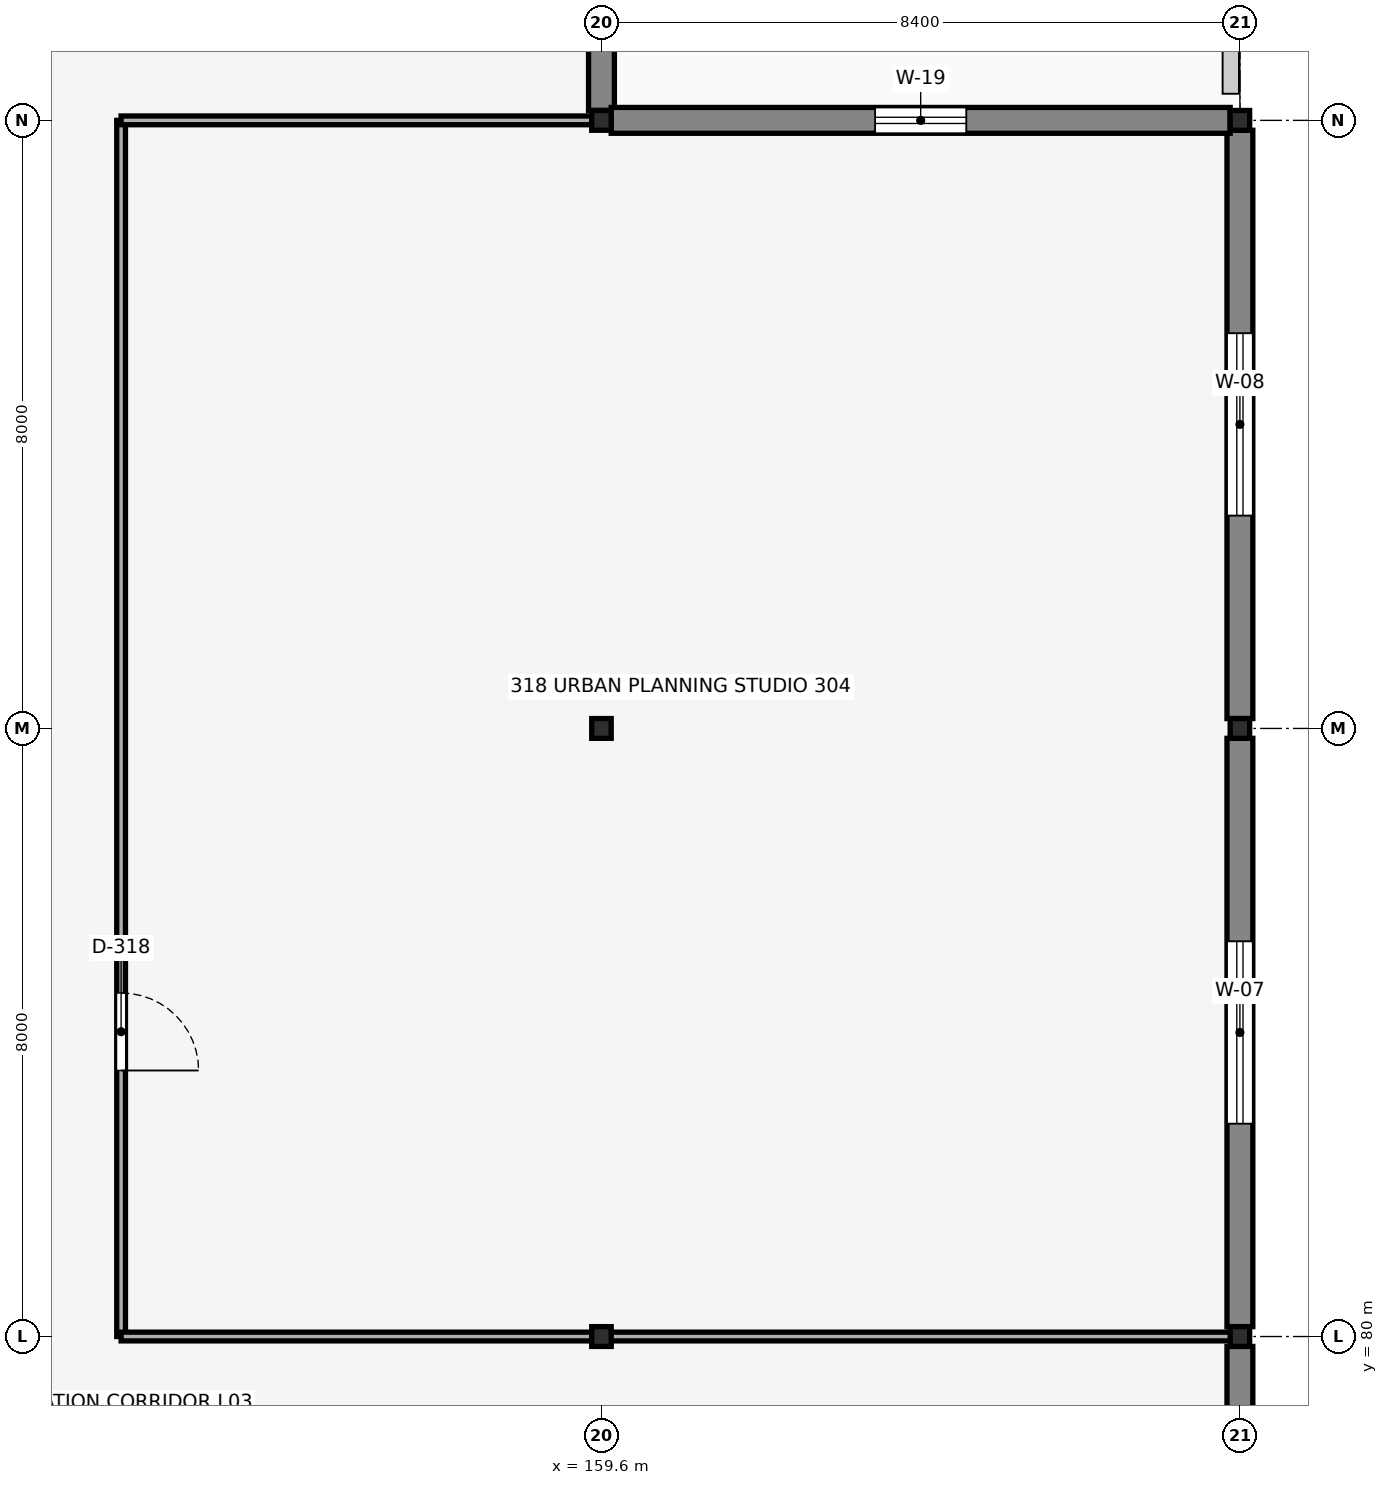
"""IFC4 building model, lengths in metres.
Left out: names, types, materials, properties, quantities, classifications, styles, units other than length and angle.
Written with IfcOpenShell. Run it as: python <this file> out.ifc"""

import sys

from ifc_helpers import new_model, si_unit, direction, frame, frame_2d, origin, origin_2d, place, context, subcontext, project, spatial, rectangle, i_section, extrude, element, fill, save


model = new_model("IFC4")
c1 = context("Model", 3, precision=1e-05, world=origin(), true_north=direction((0.0, 1.0)))
c2 = subcontext(c1, "Body", "Model", "MODEL_VIEW")
j1 = project(units=[si_unit("LENGTHUNIT", "METRE"), si_unit("PLANEANGLEUNIT", "RADIAN")], contexts=[c1])
p1 = place(None, origin())
s1 = spatial("IfcSite", under=j1, at=p1, CompositionType="ELEMENT")
p2 = place(p1, origin())
s2 = spatial("IfcBuilding", under=s1, at=p2, CompositionType="ELEMENT")
p3 = place(p2, frame((0.0, 0.0, 13.36)))
s3 = spatial("IfcBuildingStorey", under=s2, at=p3, CompositionType="ELEMENT", Elevation=13.36)
for number, where, z_axis, x_axis in (
    (1, (159.6, 80.0, 0.0), (0.0, 0.0, 1.0), (1.0, 0.0, 0.0)),
    (2, (159.6, 88.0, 0.0), (0.0, 0.0, 1.0), (1.0, 0.0, 0.0)),
    (3, (159.6, 96.0, 0.0), (0.0, 0.0, 1.0), (1.0, 0.0, 0.0)),
    (4, (168.0, 80.0, 0.0), (0.0, 0.0, 1.0), (1.0, 0.0, 0.0)),
    (5, (168.0, 88.0, 0.0), (0.0, 0.0, 1.0), (1.0, 0.0, 0.0)),
    (6, (168.0, 96.0, 0.0), (0.0, 0.0, 1.0), (1.0, 0.0, 0.0)),
):
    element("IfcColumn", number, at=place(p3, frame(where, z_axis=z_axis, x_axis=x_axis)), inside=s3, PredefinedType="COLUMN", context=c2, shape_type="SweptSolid", body=[
        extrude(i_section(OverallWidth=0.256, OverallDepth=0.26, WebThickness=0.01, FlangeThickness=0.017, FilletRadius=0.013, at=origin_2d()), origin(), (0.0, 0.0, 1.0), 3.58),
    ])
p4 = place(p3, frame((168.0, 72.13, 0.0), z_axis=(0.0, 0.0, 1.0), x_axis=(0.0, 1.0, 0.0)))
e7 = element("IfcWall", 7, at=p4, inside=s3, PredefinedType="SOLIDWALL", context=c2, shape_type="SweptSolid", body=[
    extrude(rectangle(XDim=7.74, YDim=0.34, at=frame_2d((3.87, 0.0))), origin(), (0.0, 0.0, 1.0), 3.28),
])
p5 = place(p3, frame((168.0, 80.13, 0.0), z_axis=(0.0, 0.0, 1.0), x_axis=(0.0, 1.0, 0.0)))
e8 = element("IfcWall", 8, at=p5, inside=s3, PredefinedType="SOLIDWALL", context=c2, shape_type="SweptSolid", body=[
    extrude(rectangle(XDim=7.74, YDim=0.34, at=frame_2d((3.87, 0.0))), origin(), (0.0, 0.0, 1.0), 3.28),
])
p6 = place(p5, frame((2.67, 0.0, 0.9), z_axis=(0.0, 0.0, 1.0), x_axis=(1.0, 0.0, 0.0)))
e9 = element("IfcOpeningElement", 9, at=p6, cuts=e8, PredefinedType="OPENING", context=c2, shape_type="SweptSolid", body=[
    extrude(rectangle(XDim=2.4, YDim=1.75, at=frame_2d((1.2, 0.875))), frame((0.0, 0.18, 0.0), z_axis=(0.0, -1.0, 0.0), x_axis=(1.0, 0.0, 0.0)), (0.0, 0.0, 1.0), 0.36),
])
p7 = place(p3, frame((168.0, 88.13, 0.0), z_axis=(0.0, 0.0, 1.0), x_axis=(0.0, 1.0, 0.0)))
e10 = element("IfcWall", 10, at=p7, inside=s3, PredefinedType="SOLIDWALL", context=c2, shape_type="SweptSolid", body=[
    extrude(rectangle(XDim=7.74, YDim=0.34, at=frame_2d((3.87, 0.0))), origin(), (0.0, 0.0, 1.0), 3.28),
])
p8 = place(p7, frame((2.67, 0.0, 0.9), z_axis=(0.0, 0.0, 1.0), x_axis=(1.0, 0.0, 0.0)))
e11 = element("IfcOpeningElement", 11, at=p8, cuts=e10, PredefinedType="OPENING", context=c2, shape_type="SweptSolid", body=[
    extrude(rectangle(XDim=2.4, YDim=1.5, at=frame_2d((1.2, 0.75))), frame((0.0, 0.18, 0.0), z_axis=(0.0, -1.0, 0.0), x_axis=(1.0, 0.0, 0.0)), (0.0, 0.0, 1.0), 0.36),
])
p9 = place(p3, frame((159.6, 96.13, 0.0), z_axis=(0.0, 0.0, 1.0), x_axis=(0.0, 1.0, 0.0)))
e12 = element("IfcWall", 12, at=p9, inside=s3, PredefinedType="SOLIDWALL", context=c2, shape_type="SweptSolid", body=[
    extrude(rectangle(XDim=7.74, YDim=0.34, at=frame_2d((3.87, 0.0))), origin(), (0.0, 0.0, 1.0), 3.28),
])
p10 = place(p9, frame((3.395, 0.0, 0.65), z_axis=(0.0, 0.0, 1.0), x_axis=(1.0, 0.0, 0.0)))
e13 = element("IfcOpeningElement", 13, at=p10, cuts=e12, PredefinedType="OPENING", context=c2, shape_type="SweptSolid", body=[
    extrude(rectangle(XDim=0.95, YDim=2.1, at=frame_2d((0.475, 1.05))), frame((0.0, 0.18, 0.0), z_axis=(0.0, -1.0, 0.0), x_axis=(1.0, 0.0, 0.0)), (0.0, 0.0, 1.0), 0.36),
])
p11 = place(p3, frame((159.728, 96.0, 0.0), z_axis=(0.0, 0.0, 1.0), x_axis=(1.0, 0.0, 0.0)))
e14 = element("IfcWall", 14, at=p11, inside=s3, PredefinedType="SOLIDWALL", context=c2, shape_type="SweptSolid", body=[
    extrude(rectangle(XDim=8.144, YDim=0.34, at=frame_2d((4.072, 0.0))), origin(), (0.0, 0.0, 1.0), 3.28),
])
p12 = place(p11, frame((3.472, 0.0, 1.55), z_axis=(0.0, 0.0, 1.0), x_axis=(1.0, 0.0, 0.0)))
e15 = element("IfcOpeningElement", 15, at=p12, cuts=e14, PredefinedType="OPENING", context=c2, shape_type="SweptSolid", body=[
    extrude(rectangle(XDim=1.2, YDim=0.95, at=frame_2d((0.6, 0.475))), frame((0.0, 0.18, 0.0), z_axis=(0.0, -1.0, 0.0), x_axis=(1.0, 0.0, 0.0)), (0.0, 0.0, 1.0), 0.36),
])
p13 = place(p3, frame((167.88, 111.88, 0.0), z_axis=(0.0, 0.0, 1.0), x_axis=(0.0, -1.0, 0.0)))
e16 = element("IfcWall", 16, at=p13, inside=s3, PredefinedType="PARAPET", context=c2, shape_type="SweptSolid", body=[
    extrude(rectangle(XDim=15.53, YDim=0.215, at=frame_2d((7.765, 0.0))), origin(), (0.0, 0.0, 1.0), 1.05),
])
p14 = place(p3, frame((153.28, 80.0, 0.0), z_axis=(0.0, 0.0, 1.0), x_axis=(0.0, 1.0, 0.0)))
e17 = element("IfcWall", 17, at=p14, inside=s3, PredefinedType="PARTITIONING", context=c2, shape_type="SweptSolid", body=[
    extrude(rectangle(XDim=16.0, YDim=0.115, at=frame_2d((8.0, 0.0))), origin(), (0.0, 0.0, 1.0), 3.58),
])
p15 = place(p14, frame((4.52, 0.0, 0.0), z_axis=(0.0, 0.0, 1.0), x_axis=(-1.0, 0.0, 0.0)))
e18 = element("IfcOpeningElement", 18, at=p15, cuts=e17, PredefinedType="OPENING", context=c2, shape_type="SweptSolid", body=[
    extrude(rectangle(XDim=1.02, YDim=2.16, at=frame_2d((0.51, 1.08))), frame((0.0, 0.067, 0.0), z_axis=(0.0, -1.0, 0.0), x_axis=(1.0, 0.0, 0.0)), (0.0, 0.0, 1.0), 0.135),
])
p16 = place(p3, frame((153.28, 80.0, 0.0), z_axis=(0.0, 0.0, 1.0), x_axis=(1.0, 0.0, 0.0)))
e19 = element("IfcWall", 19, at=p16, inside=s3, PredefinedType="PARTITIONING", context=c2, shape_type="SweptSolid", body=[
    extrude(rectangle(XDim=6.202, YDim=0.115, at=frame_2d((3.101, 0.0))), origin(), (0.0, 0.0, 1.0), 3.123),
])
p17 = place(p3, frame((159.718, 80.0, 0.0), z_axis=(0.0, 0.0, 1.0), x_axis=(1.0, 0.0, 0.0)))
e20 = element("IfcWall", 20, at=p17, inside=s3, PredefinedType="PARTITIONING", context=c2, shape_type="SweptSolid", body=[
    extrude(rectangle(XDim=8.164, YDim=0.115, at=frame_2d((4.082, 0.0))), origin(), (0.0, 0.0, 1.0), 3.123),
])
p18 = place(p3, frame((153.28, 96.0, 0.0), z_axis=(0.0, 0.0, 1.0), x_axis=(1.0, 0.0, 0.0)))
e21 = element("IfcWall", 21, at=p18, inside=s3, PredefinedType="PARTITIONING", context=c2, shape_type="SweptSolid", body=[
    extrude(rectangle(XDim=6.202, YDim=0.115, at=frame_2d((3.101, 0.0))), origin(), (0.0, 0.0, 1.0), 3.123),
])
p19 = place(p6, origin())
e22 = element("IfcWindow", 22, at=p19, inside=s3, PartitioningType="DOUBLE_PANEL_VERTICAL", PredefinedType="WINDOW", context=c2, shape_type="SweptSolid", body=[
    extrude(rectangle(XDim=2.4, YDim=1.75, at=frame_2d((1.2, 0.875))), frame((0.0, 0.03, 0.0), z_axis=(0.0, -1.0, 0.0), x_axis=(1.0, 0.0, 0.0)), (0.0, 0.0, 1.0), 0.06),
])
fill(e9, e22)
p20 = place(p8, origin())
e23 = element("IfcWindow", 23, at=p20, inside=s3, PartitioningType="DOUBLE_PANEL_VERTICAL", PredefinedType="WINDOW", context=c2, shape_type="SweptSolid", body=[
    extrude(rectangle(XDim=2.4, YDim=1.5, at=frame_2d((1.2, 0.75))), frame((0.0, 0.03, 0.0), z_axis=(0.0, -1.0, 0.0), x_axis=(1.0, 0.0, 0.0)), (0.0, 0.0, 1.0), 0.06),
])
fill(e11, e23)
p21 = place(p12, origin())
e24 = element("IfcWindow", 24, at=p21, inside=s3, PartitioningType="SINGLE_PANEL", PredefinedType="WINDOW", context=c2, shape_type="SweptSolid", body=[
    extrude(rectangle(XDim=1.2, YDim=0.95, at=frame_2d((0.6, 0.475))), frame((0.0, 0.03, 0.0), z_axis=(0.0, -1.0, 0.0), x_axis=(1.0, 0.0, 0.0)), (0.0, 0.0, 1.0), 0.06),
])
fill(e15, e24)
p22 = place(p15, origin())
e25 = element("IfcDoor", 25, at=p22, inside=s3, OperationType="SINGLE_SWING_RIGHT", PredefinedType="DOOR", context=c2, shape_type="SweptSolid", body=[
    extrude(rectangle(XDim=1.02, YDim=2.16, at=frame_2d((0.51, 1.08))), frame((0.0, 0.025, 0.0), z_axis=(0.0, -1.0, 0.0), x_axis=(1.0, 0.0, 0.0)), (0.0, 0.0, 1.0), 0.05),
])
fill(e18, e25)
save(model, sys.argv[1])
